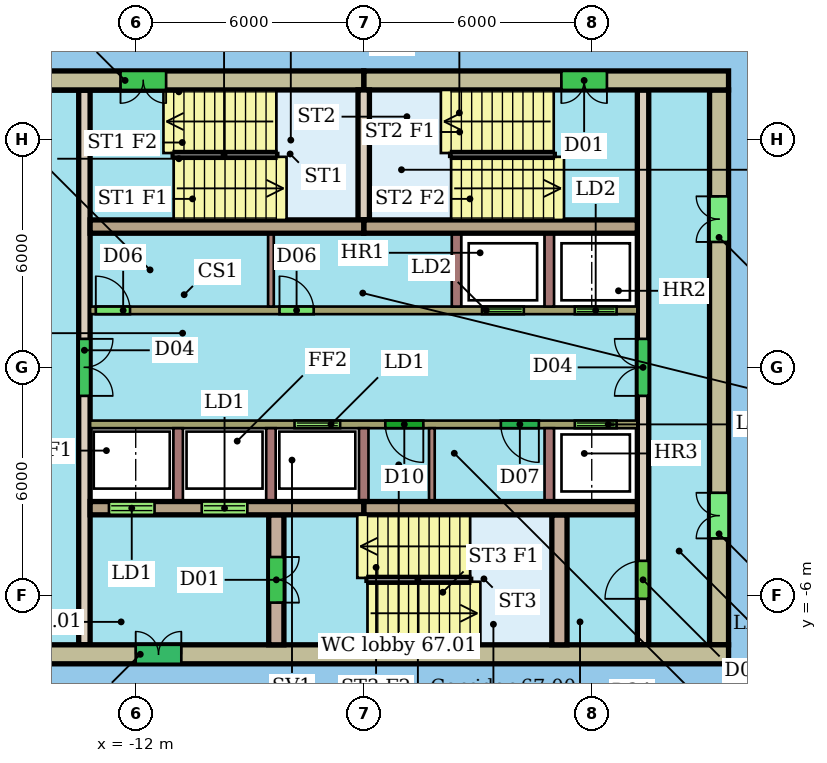
"""IFC4 building model, lengths in metres.
Left out: names, types, materials, properties, quantities, classifications, styles, units other than length and angle.
Written with IfcOpenShell. Run it as: python <this file> out.ifc"""

import sys

from ifc_helpers import new_model, si_unit, direction, frame, frame_2d, origin, place, context, subcontext, project, spatial, rectangle, extrude, element, fill, save


model = new_model("IFC4")
c1 = context("Model", 3, precision=1e-05, world=origin(), true_north=direction((0.0, 1.0)))
c2 = subcontext(c1, "Body", "Model", "MODEL_VIEW")
j1 = project(units=[si_unit("LENGTHUNIT", "METRE"), si_unit("PLANEANGLEUNIT", "RADIAN")], contexts=[c1])
p1 = place(None, origin())
s1 = spatial("IfcSite", under=j1, at=p1, CompositionType="ELEMENT")
p2 = place(p1, origin())
s2 = spatial("IfcBuilding", under=s1, at=p2, CompositionType="ELEMENT")
p3 = place(p2, frame((0.0, 0.0, 272.1)))
s3 = spatial("IfcBuildingStorey", under=s2, at=p3, CompositionType="ELEMENT", Elevation=272.1)
p4 = place(p3, frame((3.6, 7.55, 0.0), z_axis=(0.0, 0.0, 1.0), x_axis=(-1.0, 0.0, 0.0)))
e1 = element("IfcWall", 1, at=p4, inside=s3, PredefinedType="SHEAR", context=c2, shape_type="SweptSolid", body=[
    extrude(rectangle(XDim=9.6, YDim=0.5, at=frame_2d((4.8, 0.0))), origin(), (0.0, 0.0, 1.0), 3.3),
])
p5 = place(p4, frame((3.2, 0.0, 0.0)))
e2 = element("IfcOpeningElement", 2, at=p5, cuts=e1, PredefinedType="OPENING", context=c2, shape_type="SweptSolid", body=[
    extrude(rectangle(XDim=1.2, YDim=2.1, at=frame_2d((0.6, 1.05))), frame((0.0, 0.26, 0.0), z_axis=(0.0, -1.0, 0.0), x_axis=(1.0, 0.0, 0.0)), (0.0, 0.0, 1.0), 0.52),
])
p6 = place(p3, frame((-6.0, 7.55, 0.0), z_axis=(0.0, 0.0, 1.0), x_axis=(-1.0, 0.0, 0.0)))
e3 = element("IfcWall", 3, at=p6, inside=s3, PredefinedType="SHEAR", context=c2, shape_type="SweptSolid", body=[
    extrude(rectangle(XDim=9.6, YDim=0.5, at=frame_2d((4.8, 0.0))), origin(), (0.0, 0.0, 1.0), 3.3),
])
p7 = place(p6, frame((5.2, 0.0, 0.0)))
e4 = element("IfcOpeningElement", 4, at=p7, cuts=e3, PredefinedType="OPENING", context=c2, shape_type="SweptSolid", body=[
    extrude(rectangle(XDim=1.2, YDim=2.1, at=frame_2d((0.6, 1.05))), frame((0.0, 0.26, 0.0), z_axis=(0.0, -1.0, 0.0), x_axis=(1.0, 0.0, 0.0)), (0.0, 0.0, 1.0), 0.52),
])
p8 = place(p3, frame((-15.6, -7.55, 0.0), z_axis=(0.0, 0.0, 1.0), x_axis=(1.0, 0.0, 0.0)))
e5 = element("IfcWall", 5, at=p8, inside=s3, PredefinedType="SHEAR", context=c2, shape_type="SweptSolid", body=[
    extrude(rectangle(XDim=19.2, YDim=0.5, at=frame_2d((9.6, 0.0))), origin(), (0.0, 0.0, 1.0), 3.3),
])
p9 = place(p8, frame((3.6, 0.0, 0.0)))
e6 = element("IfcOpeningElement", 6, at=p9, cuts=e5, PredefinedType="OPENING", context=c2, shape_type="SweptSolid", body=[
    extrude(rectangle(XDim=1.2, YDim=2.1, at=frame_2d((0.6, 1.05))), frame((0.0, 0.26, 0.0), z_axis=(0.0, -1.0, 0.0), x_axis=(1.0, 0.0, 0.0)), (0.0, 0.0, 1.0), 0.52),
])
p10 = place(p3, frame((3.35, -7.3, 0.0), z_axis=(0.0, 0.0, 1.0), x_axis=(0.0, 1.0, 0.0)))
e7 = element("IfcWall", 7, at=p10, inside=s3, PredefinedType="SHEAR", context=c2, shape_type="SweptSolid", body=[
    extrude(rectangle(XDim=14.6, YDim=0.5, at=frame_2d((7.3, 0.0))), origin(), (0.0, 0.0, 1.0), 3.3),
])
p11 = place(p10, frame((2.8, 0.0, 0.0)))
e8 = element("IfcOpeningElement", 8, at=p11, cuts=e7, PredefinedType="OPENING", context=c2, shape_type="SweptSolid", body=[
    extrude(rectangle(XDim=1.2, YDim=2.1, at=frame_2d((0.6, 1.05))), frame((0.0, 0.26, 0.0), z_axis=(0.0, -1.0, 0.0), x_axis=(1.0, 0.0, 0.0)), (0.0, 0.0, 1.0), 0.52),
])
p12 = place(p10, frame((10.6, 0.0, 0.0)))
e9 = element("IfcOpeningElement", 9, at=p12, cuts=e7, PredefinedType="OPENING", context=c2, shape_type="SweptSolid", body=[
    extrude(rectangle(XDim=1.2, YDim=2.1, at=frame_2d((0.6, 1.05))), frame((0.0, 0.26, 0.0), z_axis=(0.0, -1.0, 0.0), x_axis=(1.0, 0.0, 0.0)), (0.0, 0.0, 1.0), 0.52),
])
for number, where, z_axis, x_axis in (
    (10, (-13.2, 3.705, 0.0), (0.0, 0.0, 1.0), (1.0, 0.0, 0.0)),
    (11, (-6.0, 3.705, 0.0), (0.0, 0.0, 1.0), (1.0, 0.0, 0.0)),
):
    element("IfcWall", number, at=place(p3, frame(where, z_axis=z_axis, x_axis=x_axis)), inside=s3, PredefinedType="SHEAR", context=c2, shape_type="SweptSolid", body=[
        extrude(rectangle(XDim=7.2, YDim=0.35, at=frame_2d((3.6, 0.0))), origin(), (0.0, 0.0, 1.0), 3.3),
    ])
p13 = place(p3, frame((-13.2, -3.705, 0.0), z_axis=(0.0, 0.0, 1.0), x_axis=(1.0, 0.0, 0.0)))
e12 = element("IfcWall", 12, at=p13, inside=s3, PredefinedType="SHEAR", context=c2, shape_type="SweptSolid", body=[
    extrude(rectangle(XDim=7.2, YDim=0.35, at=frame_2d((3.6, 0.0))), origin(), (0.0, 0.0, 1.0), 3.3),
])
p14 = place(p13, frame((0.496, 0.0, 0.0)))
e13 = element("IfcOpeningElement", 13, at=p14, cuts=e12, PredefinedType="OPENING", context=c2, shape_type="SweptSolid", body=[
    extrude(rectangle(XDim=1.2, YDim=2.1, at=frame_2d((0.6, 1.05))), frame((0.0, 0.185, 0.0), z_axis=(0.0, -1.0, 0.0), x_axis=(1.0, 0.0, 0.0)), (0.0, 0.0, 1.0), 0.37),
])
p15 = place(p13, frame((2.938, 0.0, 0.0)))
e14 = element("IfcOpeningElement", 14, at=p15, cuts=e12, PredefinedType="OPENING", context=c2, shape_type="SweptSolid", body=[
    extrude(rectangle(XDim=1.2, YDim=2.1, at=frame_2d((0.6, 1.05))), frame((0.0, 0.185, 0.0), z_axis=(0.0, -1.0, 0.0), x_axis=(1.0, 0.0, 0.0)), (0.0, 0.0, 1.0), 0.37),
])
p16 = place(p3, frame((-6.0, -3.705, 0.0), z_axis=(0.0, 0.0, 1.0), x_axis=(1.0, 0.0, 0.0)))
e15 = element("IfcWall", 15, at=p16, inside=s3, PredefinedType="SHEAR", context=c2, shape_type="SweptSolid", body=[
    extrude(rectangle(XDim=7.2, YDim=0.35, at=frame_2d((3.6, 0.0))), origin(), (0.0, 0.0, 1.0), 3.3),
])
p17 = place(p3, frame((-13.35, 7.3, 0.0), z_axis=(0.0, 0.0, 1.0), x_axis=(0.0, -1.0, 0.0)))
e16 = element("IfcWall", 16, at=p17, inside=s3, PredefinedType="SHEAR", context=c2, shape_type="SweptSolid", body=[
    extrude(rectangle(XDim=14.6, YDim=0.3, at=frame_2d((7.3, 0.0))), origin(), (0.0, 0.0, 1.0), 3.3),
])
p18 = place(p17, frame((6.55, 0.0, 0.0)))
e17 = element("IfcOpeningElement", 17, at=p18, cuts=e16, PredefinedType="OPENING", context=c2, shape_type="SweptSolid", body=[
    extrude(rectangle(XDim=1.5, YDim=2.1, at=frame_2d((0.75, 1.05))), frame((0.0, 0.16, 0.0), z_axis=(0.0, -1.0, 0.0), x_axis=(1.0, 0.0, 0.0)), (0.0, 0.0, 1.0), 0.32),
])
p19 = place(p3, frame((1.35, -7.3, 0.0), z_axis=(0.0, 0.0, 1.0), x_axis=(0.0, 1.0, 0.0)))
e18 = element("IfcWall", 18, at=p19, inside=s3, PredefinedType="SHEAR", context=c2, shape_type="SweptSolid", body=[
    extrude(rectangle(XDim=14.6, YDim=0.3, at=frame_2d((7.3, 0.0))), origin(), (0.0, 0.0, 1.0), 3.3),
])
p20 = place(p19, frame((1.21, 0.0, 0.0)))
e19 = element("IfcOpeningElement", 19, at=p20, cuts=e18, PredefinedType="OPENING", context=c2, shape_type="SweptSolid", body=[
    extrude(rectangle(XDim=1.0, YDim=2.1, at=frame_2d((0.5, 1.05))), frame((0.0, 0.16, 0.0), z_axis=(0.0, -1.0, 0.0), x_axis=(1.0, 0.0, 0.0)), (0.0, 0.0, 1.0), 0.32),
])
p21 = place(p19, frame((6.55, 0.0, 0.0)))
e20 = element("IfcOpeningElement", 20, at=p21, cuts=e18, PredefinedType="OPENING", context=c2, shape_type="SweptSolid", body=[
    extrude(rectangle(XDim=1.5, YDim=2.1, at=frame_2d((0.75, 1.05))), frame((0.0, 0.16, 0.0), z_axis=(0.0, -1.0, 0.0), x_axis=(1.0, 0.0, 0.0)), (0.0, 0.0, 1.0), 0.32),
])
p22 = place(p3, frame((-13.2, 1.5, 0.0), z_axis=(0.0, 0.0, 1.0), x_axis=(1.0, 0.0, 0.0)))
e21 = element("IfcWall", 21, at=p22, inside=s3, PredefinedType="SHEAR", context=c2, shape_type="SweptSolid", body=[
    extrude(rectangle(XDim=14.4, YDim=0.2, at=frame_2d((7.2, 0.0))), origin(), (0.0, 0.0, 1.0), 3.3),
])
p23 = place(p22, frame((10.312, 0.0, 0.0)))
e22 = element("IfcOpeningElement", 22, at=p23, cuts=e21, PredefinedType="OPENING", context=c2, shape_type="SweptSolid", body=[
    extrude(rectangle(XDim=1.1, YDim=2.1, at=frame_2d((0.55, 1.05))), frame((0.0, 0.11, 0.0), z_axis=(0.0, -1.0, 0.0), x_axis=(1.0, 0.0, 0.0)), (0.0, 0.0, 1.0), 0.22),
])
p24 = place(p22, frame((12.754, 0.0, 0.0)))
e23 = element("IfcOpeningElement", 23, at=p24, cuts=e21, PredefinedType="OPENING", context=c2, shape_type="SweptSolid", body=[
    extrude(rectangle(XDim=1.1, YDim=2.1, at=frame_2d((0.55, 1.05))), frame((0.0, 0.11, 0.0), z_axis=(0.0, -1.0, 0.0), x_axis=(1.0, 0.0, 0.0)), (0.0, 0.0, 1.0), 0.22),
])
p25 = place(p22, frame((0.15, 0.0, 0.0)))
e24 = element("IfcOpeningElement", 24, at=p25, cuts=e21, PredefinedType="OPENING", context=c2, shape_type="SweptSolid", body=[
    extrude(rectangle(XDim=0.9, YDim=2.1, at=frame_2d((0.45, 1.05))), frame((0.0, 0.11, 0.0), z_axis=(0.0, -1.0, 0.0), x_axis=(1.0, 0.0, 0.0)), (0.0, 0.0, 1.0), 0.22),
])
p26 = place(p22, frame((4.983, 0.0, 0.0)))
e25 = element("IfcOpeningElement", 25, at=p26, cuts=e21, PredefinedType="OPENING", context=c2, shape_type="SweptSolid", body=[
    extrude(rectangle(XDim=0.9, YDim=2.1, at=frame_2d((0.45, 1.05))), frame((0.0, 0.11, 0.0), z_axis=(0.0, -1.0, 0.0), x_axis=(1.0, 0.0, 0.0)), (0.0, 0.0, 1.0), 0.22),
])
p27 = place(p3, frame((1.2, -1.5, 0.0), z_axis=(0.0, 0.0, 1.0), x_axis=(-1.0, 0.0, 0.0)))
e26 = element("IfcWall", 26, at=p27, inside=s3, PredefinedType="SHEAR", context=c2, shape_type="SweptSolid", body=[
    extrude(rectangle(XDim=14.4, YDim=0.2, at=frame_2d((7.2, 0.0))), origin(), (0.0, 0.0, 1.0), 3.3),
])
p28 = place(p27, frame((7.821, 0.0, 0.0)))
e27 = element("IfcOpeningElement", 27, at=p28, cuts=e26, PredefinedType="OPENING", context=c2, shape_type="SweptSolid", body=[
    extrude(rectangle(XDim=1.2, YDim=2.1, at=frame_2d((0.6, 1.05))), frame((0.0, 0.11, 0.0), z_axis=(0.0, -1.0, 0.0), x_axis=(1.0, 0.0, 0.0)), (0.0, 0.0, 1.0), 0.22),
])
p29 = place(p27, frame((0.546, 0.0, 0.0)))
e28 = element("IfcOpeningElement", 28, at=p29, cuts=e26, PredefinedType="OPENING", context=c2, shape_type="SweptSolid", body=[
    extrude(rectangle(XDim=1.1, YDim=2.1, at=frame_2d((0.55, 1.05))), frame((0.0, 0.11, 0.0), z_axis=(0.0, -1.0, 0.0), x_axis=(1.0, 0.0, 0.0)), (0.0, 0.0, 1.0), 0.22),
])
p30 = place(p27, frame((5.632, 0.0, 0.0)))
e29 = element("IfcOpeningElement", 29, at=p30, cuts=e26, PredefinedType="OPENING", context=c2, shape_type="SweptSolid", body=[
    extrude(rectangle(XDim=1.0, YDim=2.1, at=frame_2d((0.5, 1.05))), frame((0.0, 0.11, 0.0), z_axis=(0.0, -1.0, 0.0), x_axis=(1.0, 0.0, 0.0)), (0.0, 0.0, 1.0), 0.22),
])
p31 = place(p27, frame((2.592, 0.0, 0.0)))
e30 = element("IfcOpeningElement", 30, at=p31, cuts=e26, PredefinedType="OPENING", context=c2, shape_type="SweptSolid", body=[
    extrude(rectangle(XDim=1.0, YDim=2.1, at=frame_2d((0.5, 1.05))), frame((0.0, 0.11, 0.0), z_axis=(0.0, -1.0, 0.0), x_axis=(1.0, 0.0, 0.0)), (0.0, 0.0, 1.0), 0.22),
])
p32 = place(p3, frame((-8.3, -3.88, 0.0), z_axis=(0.0, 0.0, 1.0), x_axis=(0.0, -1.0, 0.0)))
e31 = element("IfcWall", 31, at=p32, inside=s3, PredefinedType="SHEAR", context=c2, shape_type="SweptSolid", body=[
    extrude(rectangle(XDim=3.42, YDim=0.4, at=frame_2d((1.71, 0.0))), origin(), (0.0, 0.0, 1.0), 3.3),
])
p33 = place(p32, frame((1.11, 0.0, 0.0)))
e32 = element("IfcOpeningElement", 32, at=p33, cuts=e31, PredefinedType="OPENING", context=c2, shape_type="SweptSolid", body=[
    extrude(rectangle(XDim=1.2, YDim=2.1, at=frame_2d((0.6, 1.05))), frame((0.0, 0.21, 0.0), z_axis=(0.0, -1.0, 0.0), x_axis=(1.0, 0.0, 0.0)), (0.0, 0.0, 1.0), 0.42),
])
p34 = place(p3, frame((-0.85, -3.88, 0.0), z_axis=(0.0, 0.0, 1.0), x_axis=(0.0, -1.0, 0.0)))
e33 = element("IfcWall", 33, at=p34, inside=s3, PredefinedType="SHEAR", context=c2, shape_type="SweptSolid", body=[
    extrude(rectangle(XDim=3.42, YDim=0.4, at=frame_2d((1.71, 0.0))), origin(), (0.0, 0.0, 1.0), 3.3),
])
p35 = place(p3, frame((-6.0, 3.88, 0.0), z_axis=(0.0, 0.0, 1.0), x_axis=(0.0, 1.0, 0.0)))
e34 = element("IfcWall", 34, at=p35, inside=s3, PredefinedType="SHEAR", context=c2, shape_type="SweptSolid", body=[
    extrude(rectangle(XDim=3.42, YDim=0.3, at=frame_2d((1.71, 0.0))), origin(), (0.0, 0.0, 1.0), 3.3),
])
for number, where, z_axis, x_axis in (
    (35, (-3.558, 1.6, 0.0), (0.0, 0.0, 1.0), (0.0, 1.0, 0.0)),
    (36, (-1.117, 1.6, 0.0), (0.0, 0.0, 1.0), (0.0, 1.0, 0.0)),
):
    element("IfcWall", number, at=place(p3, frame(where, z_axis=z_axis, x_axis=x_axis)), inside=s3, PredefinedType="SHEAR", context=c2, shape_type="SweptSolid", body=[
        extrude(rectangle(XDim=1.93, YDim=0.25, at=frame_2d((0.965, 0.0))), origin(), (0.0, 0.0, 1.0), 3.3),
    ])
p36 = place(p3, frame((-8.442, 1.6, 0.0), z_axis=(0.0, 0.0, 1.0), x_axis=(0.0, 1.0, 0.0)))
e37 = element("IfcWall", 37, at=p36, inside=s3, PredefinedType="PARTITIONING", context=c2, shape_type="SweptSolid", body=[
    extrude(rectangle(XDim=1.93, YDim=0.15, at=frame_2d((0.965, 0.0))), origin(), (0.0, 0.0, 1.0), 3.3),
])
for number, where, z_axis, x_axis in (
    (38, (-10.883, -1.6, 0.0), (0.0, 0.0, 1.0), (0.0, -1.0, 0.0)),
    (39, (-8.442, -1.6, 0.0), (0.0, 0.0, 1.0), (0.0, -1.0, 0.0)),
    (40, (-6.0, -1.6, 0.0), (0.0, 0.0, 1.0), (0.0, -1.0, 0.0)),
    (41, (-1.117, -1.6, 0.0), (0.0, 0.0, 1.0), (0.0, -1.0, 0.0)),
):
    element("IfcWall", number, at=place(p3, frame(where, z_axis=z_axis, x_axis=x_axis)), inside=s3, PredefinedType="SHEAR", context=c2, shape_type="SweptSolid", body=[
        extrude(rectangle(XDim=1.93, YDim=0.25, at=frame_2d((0.965, 0.0))), origin(), (0.0, 0.0, 1.0), 3.3),
    ])
p37 = place(p3, frame((-4.207, -1.6, 0.0), z_axis=(0.0, 0.0, 1.0), x_axis=(0.0, -1.0, 0.0)))
e42 = element("IfcWall", 42, at=p37, inside=s3, PredefinedType="PARTITIONING", context=c2, shape_type="SweptSolid", body=[
    extrude(rectangle(XDim=1.93, YDim=0.15, at=frame_2d((0.965, 0.0))), origin(), (0.0, 0.0, 1.0), 3.3),
])
p38 = place(p5, origin())
e43 = element("IfcDoor", 43, at=p38, inside=s3, OperationType="DOUBLE_DOOR_SINGLE_SWING", PredefinedType="NOTDEFINED", context=c2, shape_type="SweptSolid", body=[
    extrude(rectangle(XDim=1.2, YDim=2.1, at=frame_2d((0.6, 1.05))), frame((0.0, 0.025, 0.0), z_axis=(0.0, -1.0, 0.0), x_axis=(1.0, 0.0, 0.0)), (0.0, 0.0, 1.0), 0.05),
])
fill(e2, e43)
p39 = place(p7, origin())
e44 = element("IfcDoor", 44, at=p39, inside=s3, OperationType="DOUBLE_DOOR_SINGLE_SWING", PredefinedType="NOTDEFINED", context=c2, shape_type="SweptSolid", body=[
    extrude(rectangle(XDim=1.2, YDim=2.1, at=frame_2d((0.6, 1.05))), frame((0.0, 0.025, 0.0), z_axis=(0.0, -1.0, 0.0), x_axis=(1.0, 0.0, 0.0)), (0.0, 0.0, 1.0), 0.05),
])
fill(e4, e44)
p40 = place(p9, origin())
e45 = element("IfcDoor", 45, at=p40, inside=s3, OperationType="DOUBLE_DOOR_SINGLE_SWING", PredefinedType="NOTDEFINED", context=c2, shape_type="SweptSolid", body=[
    extrude(rectangle(XDim=1.2, YDim=2.1, at=frame_2d((0.6, 1.05))), frame((0.0, 0.025, 0.0), z_axis=(0.0, -1.0, 0.0), x_axis=(1.0, 0.0, 0.0)), (0.0, 0.0, 1.0), 0.05),
])
fill(e6, e45)
p41 = place(p11, origin())
e46 = element("IfcDoor", 46, at=p41, inside=s3, OperationType="DOUBLE_DOOR_SINGLE_SWING", PredefinedType="NOTDEFINED", context=c2, shape_type="SweptSolid", body=[
    extrude(rectangle(XDim=1.2, YDim=2.1, at=frame_2d((0.6, 1.05))), frame((0.0, 0.025, 0.0), z_axis=(0.0, -1.0, 0.0), x_axis=(1.0, 0.0, 0.0)), (0.0, 0.0, 1.0), 0.05),
])
fill(e8, e46)
p42 = place(p12, origin())
e47 = element("IfcDoor", 47, at=p42, inside=s3, OperationType="DOUBLE_DOOR_SINGLE_SWING", PredefinedType="NOTDEFINED", context=c2, shape_type="SweptSolid", body=[
    extrude(rectangle(XDim=1.2, YDim=2.1, at=frame_2d((0.6, 1.05))), frame((0.0, 0.025, 0.0), z_axis=(0.0, -1.0, 0.0), x_axis=(1.0, 0.0, 0.0)), (0.0, 0.0, 1.0), 0.05),
])
fill(e9, e47)
p43 = place(p14, origin())
e48 = element("IfcDoor", 48, at=p43, inside=s3, OperationType="DOUBLE_DOOR_SLIDING", PredefinedType="NOTDEFINED", context=c2, shape_type="SweptSolid", body=[
    extrude(rectangle(XDim=1.2, YDim=2.1, at=frame_2d((0.6, 1.05))), frame((0.0, 0.025, 0.0), z_axis=(0.0, -1.0, 0.0), x_axis=(1.0, 0.0, 0.0)), (0.0, 0.0, 1.0), 0.05),
])
fill(e13, e48)
p44 = place(p15, origin())
e49 = element("IfcDoor", 49, at=p44, inside=s3, OperationType="DOUBLE_DOOR_SLIDING", PredefinedType="NOTDEFINED", context=c2, shape_type="SweptSolid", body=[
    extrude(rectangle(XDim=1.2, YDim=2.1, at=frame_2d((0.6, 1.05))), frame((0.0, 0.025, 0.0), z_axis=(0.0, -1.0, 0.0), x_axis=(1.0, 0.0, 0.0)), (0.0, 0.0, 1.0), 0.05),
])
fill(e14, e49)
p45 = place(p18, origin())
e50 = element("IfcDoor", 50, at=p45, inside=s3, OperationType="DOUBLE_DOOR_SINGLE_SWING", PredefinedType="NOTDEFINED", context=c2, shape_type="SweptSolid", body=[
    extrude(rectangle(XDim=1.5, YDim=2.1, at=frame_2d((0.75, 1.05))), frame((0.0, 0.025, 0.0), z_axis=(0.0, -1.0, 0.0), x_axis=(1.0, 0.0, 0.0)), (0.0, 0.0, 1.0), 0.05),
])
fill(e17, e50)
p46 = place(p20, origin())
e51 = element("IfcDoor", 51, at=p46, inside=s3, OperationType="SINGLE_SWING_LEFT", PredefinedType="NOTDEFINED", context=c2, shape_type="SweptSolid", body=[
    extrude(rectangle(XDim=1.0, YDim=2.1, at=frame_2d((0.5, 1.05))), frame((0.0, 0.025, 0.0), z_axis=(0.0, -1.0, 0.0), x_axis=(1.0, 0.0, 0.0)), (0.0, 0.0, 1.0), 0.05),
])
fill(e19, e51)
p47 = place(p21, origin())
e52 = element("IfcDoor", 52, at=p47, inside=s3, OperationType="DOUBLE_DOOR_SINGLE_SWING", PredefinedType="NOTDEFINED", context=c2, shape_type="SweptSolid", body=[
    extrude(rectangle(XDim=1.5, YDim=2.1, at=frame_2d((0.75, 1.05))), frame((0.0, 0.025, 0.0), z_axis=(0.0, -1.0, 0.0), x_axis=(1.0, 0.0, 0.0)), (0.0, 0.0, 1.0), 0.05),
])
fill(e20, e52)
p48 = place(p23, origin())
e53 = element("IfcDoor", 53, at=p48, inside=s3, OperationType="DOUBLE_DOOR_SLIDING", PredefinedType="NOTDEFINED", context=c2, shape_type="SweptSolid", body=[
    extrude(rectangle(XDim=1.1, YDim=2.1, at=frame_2d((0.55, 1.05))), frame((0.0, 0.025, 0.0), z_axis=(0.0, -1.0, 0.0), x_axis=(1.0, 0.0, 0.0)), (0.0, 0.0, 1.0), 0.05),
])
fill(e22, e53)
p49 = place(p24, origin())
e54 = element("IfcDoor", 54, at=p49, inside=s3, OperationType="DOUBLE_DOOR_SLIDING", PredefinedType="NOTDEFINED", context=c2, shape_type="SweptSolid", body=[
    extrude(rectangle(XDim=1.1, YDim=2.1, at=frame_2d((0.55, 1.05))), frame((0.0, 0.025, 0.0), z_axis=(0.0, -1.0, 0.0), x_axis=(1.0, 0.0, 0.0)), (0.0, 0.0, 1.0), 0.05),
])
fill(e23, e54)
p50 = place(p25, origin())
e55 = element("IfcDoor", 55, at=p50, inside=s3, OperationType="SINGLE_SWING_LEFT", PredefinedType="NOTDEFINED", context=c2, shape_type="SweptSolid", body=[
    extrude(rectangle(XDim=0.9, YDim=2.1, at=frame_2d((0.45, 1.05))), frame((0.0, 0.025, 0.0), z_axis=(0.0, -1.0, 0.0), x_axis=(1.0, 0.0, 0.0)), (0.0, 0.0, 1.0), 0.05),
])
fill(e24, e55)
p51 = place(p26, origin())
e56 = element("IfcDoor", 56, at=p51, inside=s3, OperationType="SINGLE_SWING_LEFT", PredefinedType="NOTDEFINED", context=c2, shape_type="SweptSolid", body=[
    extrude(rectangle(XDim=0.9, YDim=2.1, at=frame_2d((0.45, 1.05))), frame((0.0, 0.025, 0.0), z_axis=(0.0, -1.0, 0.0), x_axis=(1.0, 0.0, 0.0)), (0.0, 0.0, 1.0), 0.05),
])
fill(e25, e56)
p52 = place(p28, origin())
e57 = element("IfcDoor", 57, at=p52, inside=s3, OperationType="DOUBLE_DOOR_SLIDING", PredefinedType="NOTDEFINED", context=c2, shape_type="SweptSolid", body=[
    extrude(rectangle(XDim=1.2, YDim=2.1, at=frame_2d((0.6, 1.05))), frame((0.0, 0.025, 0.0), z_axis=(0.0, -1.0, 0.0), x_axis=(1.0, 0.0, 0.0)), (0.0, 0.0, 1.0), 0.05),
])
fill(e27, e57)
p53 = place(p29, origin())
e58 = element("IfcDoor", 58, at=p53, inside=s3, OperationType="DOUBLE_DOOR_SLIDING", PredefinedType="NOTDEFINED", context=c2, shape_type="SweptSolid", body=[
    extrude(rectangle(XDim=1.1, YDim=2.1, at=frame_2d((0.55, 1.05))), frame((0.0, 0.025, 0.0), z_axis=(0.0, -1.0, 0.0), x_axis=(1.0, 0.0, 0.0)), (0.0, 0.0, 1.0), 0.05),
])
fill(e28, e58)
p54 = place(p30, origin())
e59 = element("IfcDoor", 59, at=p54, inside=s3, OperationType="SINGLE_SWING_LEFT", PredefinedType="NOTDEFINED", context=c2, shape_type="SweptSolid", body=[
    extrude(rectangle(XDim=1.0, YDim=2.1, at=frame_2d((0.5, 1.05))), frame((0.0, 0.025, 0.0), z_axis=(0.0, -1.0, 0.0), x_axis=(1.0, 0.0, 0.0)), (0.0, 0.0, 1.0), 0.05),
])
fill(e29, e59)
p55 = place(p31, origin())
e60 = element("IfcDoor", 60, at=p55, inside=s3, OperationType="SINGLE_SWING_LEFT", PredefinedType="NOTDEFINED", context=c2, shape_type="SweptSolid", body=[
    extrude(rectangle(XDim=1.0, YDim=2.1, at=frame_2d((0.5, 1.05))), frame((0.0, 0.025, 0.0), z_axis=(0.0, -1.0, 0.0), x_axis=(1.0, 0.0, 0.0)), (0.0, 0.0, 1.0), 0.05),
])
fill(e30, e60)
p56 = place(p33, origin())
e61 = element("IfcDoor", 61, at=p56, inside=s3, OperationType="DOUBLE_DOOR_SINGLE_SWING", PredefinedType="NOTDEFINED", context=c2, shape_type="SweptSolid", body=[
    extrude(rectangle(XDim=1.2, YDim=2.1, at=frame_2d((0.6, 1.05))), frame((0.0, 0.025, 0.0), z_axis=(0.0, -1.0, 0.0), x_axis=(1.0, 0.0, 0.0)), (0.0, 0.0, 1.0), 0.05),
])
fill(e32, e61)
save(model, sys.argv[1])
